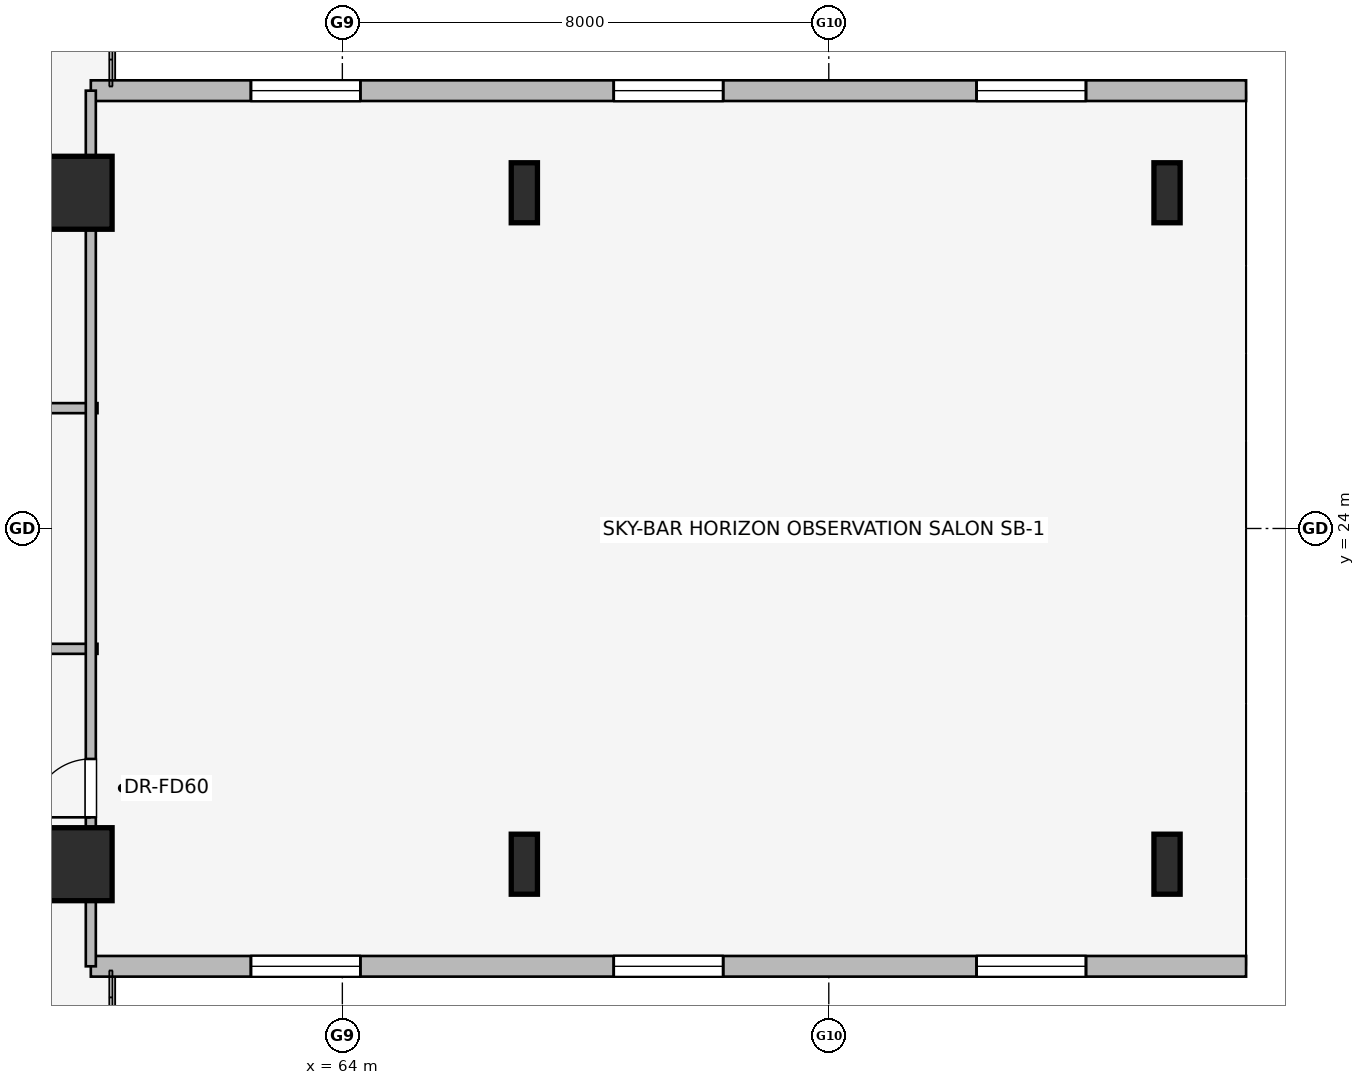
"""IFC4 building model, lengths in metres.
Left out: names, types, materials, properties, quantities, classifications, styles, units other than length and angle.
Written with IfcOpenShell. Run it as: python <this file> out.ifc"""

import sys

from ifc_helpers import new_model, si_unit, direction, frame, frame_2d, origin, origin_2d, place, context, subcontext, project, spatial, rectangle, i_section, extrude, element, fill, save


model = new_model("IFC4")
c1 = context("Model", 3, precision=1e-05, world=origin(), true_north=direction((0.0, 1.0)))
c2 = subcontext(c1, "Body", "Model", "MODEL_VIEW")
j1 = project(units=[si_unit("LENGTHUNIT", "METRE"), si_unit("PLANEANGLEUNIT", "RADIAN")], contexts=[c1])
p1 = place(None, origin())
s1 = spatial("IfcSite", under=j1, at=p1, CompositionType="ELEMENT")
p2 = place(p1, origin())
s2 = spatial("IfcBuilding", under=s1, at=p2, CompositionType="ELEMENT")
p3 = place(p2, frame((0.0, 0.0, 52.55)))
s3 = spatial("IfcBuildingStorey", under=s2, at=p3, CompositionType="ELEMENT", Elevation=52.55)
for number, where, z_axis, x_axis in (
    (1, (59.613, 18.479, 0.0), (0.0, 0.0, 1.0), (1.0, 0.0, 0.0)),
    (2, (59.613, 29.521, 0.0), (0.0, 0.0, 1.0), (1.0, 0.0, 0.0)),
):
    element("IfcColumn", number, at=place(p3, frame(where, z_axis=z_axis, x_axis=x_axis)), inside=s3, PredefinedType="COLUMN", context=c2, shape_type="SweptSolid", body=[
        extrude(rectangle(XDim=1.2, YDim=1.2, at=origin_2d()), origin(), (0.0, 0.0, 1.0), 3.65),
    ])
for number, where, z_axis, x_axis in (
    (3, (66.993, 18.479, -0.29), (0.0, 0.0, 1.0), (1.0, 0.0, 0.0)),
    (4, (66.993, 29.521, -0.29), (0.0, 0.0, 1.0), (1.0, 0.0, 0.0)),
    (5, (77.563, 18.479, -0.29), (0.0, 0.0, 1.0), (1.0, 0.0, 0.0)),
    (6, (77.563, 29.521, -0.29), (0.0, 0.0, 1.0), (1.0, 0.0, 0.0)),
):
    element("IfcColumn", number, at=place(p3, frame(where, z_axis=z_axis, x_axis=x_axis)), inside=s3, PredefinedType="COLUMN", context=c2, shape_type="SweptSolid", body=[
        extrude(i_section(OverallWidth=0.431, OverallDepth=0.987, WebThickness=0.034, FlangeThickness=0.062, at=origin_2d()), origin(), (0.0, 0.0, 1.0), 3.94),
    ])
p4 = place(p3, frame((78.863, 16.8, 0.0), z_axis=(0.0, 0.0, 1.0), x_axis=(-1.0, 0.0, 0.0)))
e7 = element("IfcWall", 7, at=p4, inside=s3, PredefinedType="STANDARD", context=c2, shape_type="SweptSolid", body=[
    extrude(rectangle(XDim=19.0, YDim=0.34, at=frame_2d((9.5, 0.0))), origin(), (0.0, 0.0, 1.0), 3.36),
])
p5 = place(p4, frame((2.633, 0.0, 0.75)))
e8 = element("IfcOpeningElement", 8, at=p5, cuts=e7, PredefinedType="OPENING", context=c2, shape_type="SweptSolid", body=[
    extrude(rectangle(XDim=1.8, YDim=1.5, at=frame_2d((0.9, 0.75))), frame((0.0, 0.18, 0.0), z_axis=(0.0, -1.0, 0.0), x_axis=(1.0, 0.0, 0.0)), (0.0, 0.0, 1.0), 0.36),
])
p6 = place(p4, frame((8.6, 0.0, 0.75)))
e9 = element("IfcOpeningElement", 9, at=p6, cuts=e7, PredefinedType="OPENING", context=c2, shape_type="SweptSolid", body=[
    extrude(rectangle(XDim=1.8, YDim=1.5, at=frame_2d((0.9, 0.75))), frame((0.0, 0.18, 0.0), z_axis=(0.0, -1.0, 0.0), x_axis=(1.0, 0.0, 0.0)), (0.0, 0.0, 1.0), 0.36),
])
p7 = place(p4, frame((14.567, 0.0, 0.75)))
e10 = element("IfcOpeningElement", 10, at=p7, cuts=e7, PredefinedType="OPENING", context=c2, shape_type="SweptSolid", body=[
    extrude(rectangle(XDim=1.8, YDim=1.5, at=frame_2d((0.9, 0.75))), frame((0.0, 0.18, 0.0), z_axis=(0.0, -1.0, 0.0), x_axis=(1.0, 0.0, 0.0)), (0.0, 0.0, 1.0), 0.36),
])
p8 = place(p3, frame((59.863, 31.2, 0.0), z_axis=(0.0, 0.0, 1.0), x_axis=(1.0, 0.0, 0.0)))
e11 = element("IfcWall", 11, at=p8, inside=s3, PredefinedType="STANDARD", context=c2, shape_type="SweptSolid", body=[
    extrude(rectangle(XDim=19.0, YDim=0.34, at=frame_2d((9.5, 0.0))), origin(), (0.0, 0.0, 1.0), 3.36),
])
p9 = place(p8, frame((2.633, 0.0, 0.75)))
e12 = element("IfcOpeningElement", 12, at=p9, cuts=e11, PredefinedType="OPENING", context=c2, shape_type="SweptSolid", body=[
    extrude(rectangle(XDim=1.8, YDim=1.5, at=frame_2d((0.9, 0.75))), frame((0.0, 0.18, 0.0), z_axis=(0.0, -1.0, 0.0), x_axis=(1.0, 0.0, 0.0)), (0.0, 0.0, 1.0), 0.36),
])
p10 = place(p8, frame((8.6, 0.0, 0.75)))
e13 = element("IfcOpeningElement", 13, at=p10, cuts=e11, PredefinedType="OPENING", context=c2, shape_type="SweptSolid", body=[
    extrude(rectangle(XDim=1.8, YDim=1.5, at=frame_2d((0.9, 0.75))), frame((0.0, 0.18, 0.0), z_axis=(0.0, -1.0, 0.0), x_axis=(1.0, 0.0, 0.0)), (0.0, 0.0, 1.0), 0.36),
])
p11 = place(p8, frame((14.567, 0.0, 0.75)))
e14 = element("IfcOpeningElement", 14, at=p11, cuts=e11, PredefinedType="OPENING", context=c2, shape_type="SweptSolid", body=[
    extrude(rectangle(XDim=1.8, YDim=1.5, at=frame_2d((0.9, 0.75))), frame((0.0, 0.18, 0.0), z_axis=(0.0, -1.0, 0.0), x_axis=(1.0, 0.0, 0.0)), (0.0, 0.0, 1.0), 0.36),
])
for number, where, z_axis, x_axis in (
    (15, (41.52, 18.14, 0.0), (0.0, 0.0, 1.0), (1.0, 0.0, 0.0)),
    (16, (41.52, 29.86, 0.0), (0.0, 0.0, 1.0), (1.0, 0.0, 0.0)),
):
    element("IfcWall", number, at=place(p3, frame(where, z_axis=z_axis, x_axis=x_axis)), inside=s3, PredefinedType="PARTITIONING", context=c2, shape_type="SweptSolid", body=[
        extrude(rectangle(XDim=18.453, YDim=0.165, at=frame_2d((9.227, 0.0))), origin(), (0.0, 0.0, 1.0), 2.483),
    ])
for number, where, z_axis, x_axis in (
    (17, (41.59, 22.021, 0.0), (0.0, 0.0, 1.0), (1.0, 0.0, 0.0)),
    (18, (41.59, 25.979, 0.0), (0.0, 0.0, 1.0), (1.0, 0.0, 0.0)),
):
    element("IfcWall", number, at=place(p3, frame(where, z_axis=z_axis, x_axis=x_axis)), inside=s3, PredefinedType="PARTITIONING", context=c2, shape_type="SweptSolid", body=[
        extrude(rectangle(XDim=18.383, YDim=0.165, at=frame_2d((9.191, 0.0))), origin(), (0.0, 0.0, 1.0), 3.36),
    ])
p12 = place(p3, frame((59.863, 16.8, 0.0), z_axis=(0.0, 0.0, 1.0), x_axis=(0.0, 1.0, 0.0)))
e19 = element("IfcWall", 19, at=p12, inside=s3, PredefinedType="PARTITIONING", context=c2, shape_type="SweptSolid", body=[
    extrude(rectangle(XDim=14.4, YDim=0.165, at=frame_2d((7.2, 0.0))), origin(), (0.0, 0.0, 1.0), 2.654),
])
p13 = place(p12, frame((2.45, 0.0, 0.0)))
e20 = element("IfcOpeningElement", 20, at=p13, cuts=e19, PredefinedType="OPENING", context=c2, shape_type="SweptSolid", body=[
    extrude(rectangle(XDim=0.96, YDim=2.0, at=frame_2d((0.48, 1.0))), frame((0.0, 0.093, 0.0), z_axis=(0.0, -1.0, 0.0), x_axis=(1.0, 0.0, 0.0)), (0.0, 0.0, 1.0), 0.185),
])
p14 = place(p5, origin())
e21 = element("IfcWindow", 21, at=p14, inside=s3, PartitioningType="SINGLE_PANEL", PredefinedType="WINDOW", context=c2, shape_type="SweptSolid", body=[
    extrude(rectangle(XDim=1.8, YDim=1.5, at=frame_2d((0.9, 0.75))), frame((0.0, 0.03, 0.0), z_axis=(0.0, -1.0, 0.0), x_axis=(1.0, 0.0, 0.0)), (0.0, 0.0, 1.0), 0.06),
])
fill(e8, e21)
p15 = place(p6, origin())
e22 = element("IfcWindow", 22, at=p15, inside=s3, PartitioningType="SINGLE_PANEL", PredefinedType="WINDOW", context=c2, shape_type="SweptSolid", body=[
    extrude(rectangle(XDim=1.8, YDim=1.5, at=frame_2d((0.9, 0.75))), frame((0.0, 0.03, 0.0), z_axis=(0.0, -1.0, 0.0), x_axis=(1.0, 0.0, 0.0)), (0.0, 0.0, 1.0), 0.06),
])
fill(e9, e22)
p16 = place(p7, origin())
e23 = element("IfcWindow", 23, at=p16, inside=s3, PartitioningType="SINGLE_PANEL", PredefinedType="WINDOW", context=c2, shape_type="SweptSolid", body=[
    extrude(rectangle(XDim=1.8, YDim=1.5, at=frame_2d((0.9, 0.75))), frame((0.0, 0.03, 0.0), z_axis=(0.0, -1.0, 0.0), x_axis=(1.0, 0.0, 0.0)), (0.0, 0.0, 1.0), 0.06),
])
fill(e10, e23)
p17 = place(p9, origin())
e24 = element("IfcWindow", 24, at=p17, inside=s3, PartitioningType="SINGLE_PANEL", PredefinedType="WINDOW", context=c2, shape_type="SweptSolid", body=[
    extrude(rectangle(XDim=1.8, YDim=1.5, at=frame_2d((0.9, 0.75))), frame((0.0, 0.03, 0.0), z_axis=(0.0, -1.0, 0.0), x_axis=(1.0, 0.0, 0.0)), (0.0, 0.0, 1.0), 0.06),
])
fill(e12, e24)
p18 = place(p10, origin())
e25 = element("IfcWindow", 25, at=p18, inside=s3, PartitioningType="SINGLE_PANEL", PredefinedType="WINDOW", context=c2, shape_type="SweptSolid", body=[
    extrude(rectangle(XDim=1.8, YDim=1.5, at=frame_2d((0.9, 0.75))), frame((0.0, 0.03, 0.0), z_axis=(0.0, -1.0, 0.0), x_axis=(1.0, 0.0, 0.0)), (0.0, 0.0, 1.0), 0.06),
])
fill(e13, e25)
p19 = place(p11, origin())
e26 = element("IfcWindow", 26, at=p19, inside=s3, PartitioningType="SINGLE_PANEL", PredefinedType="WINDOW", context=c2, shape_type="SweptSolid", body=[
    extrude(rectangle(XDim=1.8, YDim=1.5, at=frame_2d((0.9, 0.75))), frame((0.0, 0.03, 0.0), z_axis=(0.0, -1.0, 0.0), x_axis=(1.0, 0.0, 0.0)), (0.0, 0.0, 1.0), 0.06),
])
fill(e14, e26)
p20 = place(p13, origin())
e27 = element("IfcDoor", 27, at=p20, inside=s3, OperationType="SINGLE_SWING_LEFT", PredefinedType="DOOR", context=c2, shape_type="SweptSolid", body=[
    extrude(rectangle(XDim=0.96, YDim=2.0, at=frame_2d((0.48, 1.0))), frame((0.0, 0.025, 0.0), z_axis=(0.0, -1.0, 0.0), x_axis=(1.0, 0.0, 0.0)), (0.0, 0.0, 1.0), 0.05),
])
fill(e20, e27)
save(model, sys.argv[1])
